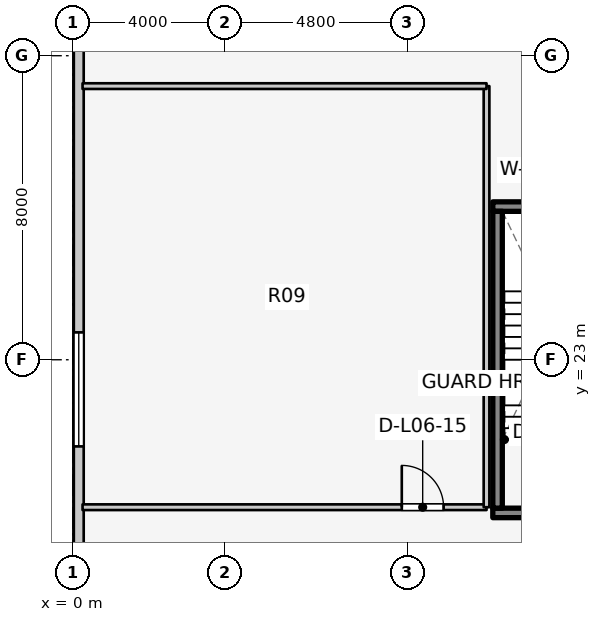
"""IFC4 building model, lengths in metres.
Left out: names, types, materials, properties, quantities, classifications, styles, units other than length and angle.
Written with IfcOpenShell. Run it as: python <this file> out.ifc"""

import sys

from ifc_helpers import new_model, si_unit, direction, frame, frame_2d, origin, place, context, subcontext, project, spatial, rectangle, extrude, element, fill, save


model = new_model("IFC4")
c1 = context("Model", 3, precision=1e-05, world=origin(), true_north=direction((0.0, 1.0)))
c2 = subcontext(c1, "Body", "Model", "MODEL_VIEW")
j1 = project(units=[si_unit("LENGTHUNIT", "METRE"), si_unit("PLANEANGLEUNIT", "RADIAN")], contexts=[c1])
p1 = place(None, origin())
s1 = spatial("IfcSite", under=j1, at=p1, CompositionType="ELEMENT")
p2 = place(p1, origin())
s2 = spatial("IfcBuilding", under=s1, at=p2, CompositionType="ELEMENT")
p3 = place(p2, frame((0.0, 0.0, 23.0)))
s3 = spatial("IfcBuildingStorey", under=s2, at=p3, CompositionType="ELEMENT", Elevation=23.0)
p4 = place(p3, frame((11.045, 18.97, 0.0), z_axis=(0.0, 0.0, 1.0), x_axis=(1.0, 0.0, 0.0)))
e1 = element("IfcWall", 1, at=p4, inside=s3, PredefinedType="SOLIDWALL", context=c2, shape_type="SweptSolid", body=[
    extrude(rectangle(XDim=3.782, YDim=0.25, at=frame_2d((1.891, 0.0))), origin(), (0.0, 0.0, 1.0), 4.6),
])
p5 = place(p4, frame((1.135, 0.0, 0.0)))
e2 = element("IfcOpeningElement", 2, at=p5, cuts=e1, PredefinedType="OPENING", context=c2, shape_type="SweptSolid", body=[
    extrude(rectangle(XDim=1.1, YDim=2.1, at=frame_2d((0.55, 1.05))), frame((0.0, 0.135, 0.0), z_axis=(0.0, -1.0, 0.0), x_axis=(1.0, 0.0, 0.0)), (0.0, 0.0, 1.0), 0.27),
])
p6 = place(p3, frame((11.045, 27.03, 0.0), z_axis=(0.0, 0.0, 1.0), x_axis=(1.0, 0.0, 0.0)))
e3 = element("IfcWall", 3, at=p6, inside=s3, PredefinedType="SOLIDWALL", context=c2, shape_type="SweptSolid", body=[
    extrude(rectangle(XDim=3.782, YDim=0.25, at=frame_2d((1.891, 0.0))), origin(), (0.0, 0.0, 1.0), 4.6),
])
p7 = place(p3, frame((11.17, 19.095, 0.0), z_axis=(0.0, 0.0, 1.0), x_axis=(0.0, 1.0, 0.0)))
e4 = element("IfcWall", 4, at=p7, inside=s3, PredefinedType="SOLIDWALL", context=c2, shape_type="SweptSolid", body=[
    extrude(rectangle(XDim=7.81, YDim=0.25, at=frame_2d((3.905, 0.0))), origin(), (0.0, 0.0, 1.0), 4.6),
])
p8 = place(p3, frame((0.15, 45.72, 0.0), z_axis=(0.0, 0.0, 1.0), x_axis=(0.0, -1.0, 0.0)))
e5 = element("IfcWall", 5, at=p8, inside=s3, PredefinedType="STANDARD", context=c2, shape_type="SweptSolid", body=[
    extrude(rectangle(XDim=45.44, YDim=0.26, at=frame_2d((22.72, 0.0))), origin(), (0.0, 0.0, 1.0), 4.1),
])
p9 = place(p8, frame((6.0, 0.0, 0.9)))
e6 = element("IfcOpeningElement", 6, at=p9, cuts=e5, PredefinedType="OPENING", context=c2, shape_type="SweptSolid", body=[
    extrude(rectangle(XDim=3.0, YDim=2.4, at=frame_2d((1.5, 1.2))), frame((0.0, 0.14, 0.0), z_axis=(0.0, -1.0, 0.0), x_axis=(1.0, 0.0, 0.0)), (0.0, 0.0, 1.0), 0.28),
])
p10 = place(p8, frame((22.0, 0.0, 0.9)))
e7 = element("IfcOpeningElement", 7, at=p10, cuts=e5, PredefinedType="OPENING", context=c2, shape_type="SweptSolid", body=[
    extrude(rectangle(XDim=3.0, YDim=2.4, at=frame_2d((1.5, 1.2))), frame((0.0, 0.14, 0.0), z_axis=(0.0, -1.0, 0.0), x_axis=(1.0, 0.0, 0.0)), (0.0, 0.0, 1.0), 0.28),
])
p11 = place(p8, frame((38.0, 0.0, 0.9)))
e8 = element("IfcOpeningElement", 8, at=p11, cuts=e5, PredefinedType="OPENING", context=c2, shape_type="SweptSolid", body=[
    extrude(rectangle(XDim=3.0, YDim=2.4, at=frame_2d((1.5, 1.2))), frame((0.0, 0.14, 0.0), z_axis=(0.0, -1.0, 0.0), x_axis=(1.0, 0.0, 0.0)), (0.0, 0.0, 1.0), 0.28),
])
p12 = place(p3, frame((0.25, 19.12, 0.0), z_axis=(0.0, 0.0, 1.0), x_axis=(1.0, 0.0, 0.0)))
e9 = element("IfcWall", 9, at=p12, inside=s3, PredefinedType="PARTITIONING", context=c2, shape_type="SweptSolid", body=[
    extrude(rectangle(XDim=10.63, YDim=0.15, at=frame_2d((5.315, 0.0))), origin(), (0.0, 0.0, 1.0), 2.67),
])
p13 = place(p12, frame((8.4, 0.0, 0.0)))
e10 = element("IfcOpeningElement", 10, at=p13, cuts=e9, PredefinedType="OPENING", context=c2, shape_type="SweptSolid", body=[
    extrude(rectangle(XDim=1.1, YDim=2.1, at=frame_2d((0.55, 1.05))), frame((0.0, 0.085, 0.0), z_axis=(0.0, -1.0, 0.0), x_axis=(1.0, 0.0, 0.0)), (0.0, 0.0, 1.0), 0.17),
])
p14 = place(p3, frame((10.88, 19.12, 0.0), z_axis=(0.0, 0.0, 1.0), x_axis=(0.0, 1.0, 0.0)))
e11 = element("IfcWall", 11, at=p14, inside=s3, PredefinedType="PARTITIONING", context=c2, shape_type="SweptSolid", body=[
    extrude(rectangle(XDim=11.08, YDim=0.15, at=frame_2d((5.54, 0.0))), origin(), (0.0, 0.0, 1.0), 3.62),
])
p15 = place(p3, frame((0.25, 30.2, 0.0), z_axis=(0.0, 0.0, 1.0), x_axis=(1.0, 0.0, 0.0)))
e12 = element("IfcWall", 12, at=p15, inside=s3, PredefinedType="PARTITIONING", context=c2, shape_type="SweptSolid", body=[
    extrude(rectangle(XDim=10.63, YDim=0.15, at=frame_2d((5.315, 0.0))), origin(), (0.0, 0.0, 1.0), 2.67),
])
p16 = place(p10, origin())
e13 = element("IfcWindow", 13, at=p16, inside=s3, PartitioningType="SINGLE_PANEL", PredefinedType="WINDOW", context=c2, shape_type="SweptSolid", body=[
    extrude(rectangle(XDim=3.0, YDim=2.4, at=frame_2d((1.5, 1.2))), frame((0.0, 0.03, 0.0), z_axis=(0.0, -1.0, 0.0), x_axis=(1.0, 0.0, 0.0)), (0.0, 0.0, 1.0), 0.06),
])
fill(e7, e13)
p17 = place(p13, origin())
e14 = element("IfcDoor", 14, at=p17, inside=s3, OperationType="SINGLE_SWING_LEFT", PredefinedType="DOOR", context=c2, shape_type="SweptSolid", body=[
    extrude(rectangle(XDim=1.1, YDim=2.1, at=frame_2d((0.55, 1.05))), frame((0.0, 0.025, 0.0), z_axis=(0.0, -1.0, 0.0), x_axis=(1.0, 0.0, 0.0)), (0.0, 0.0, 1.0), 0.05),
])
fill(e10, e14)
save(model, sys.argv[1])
